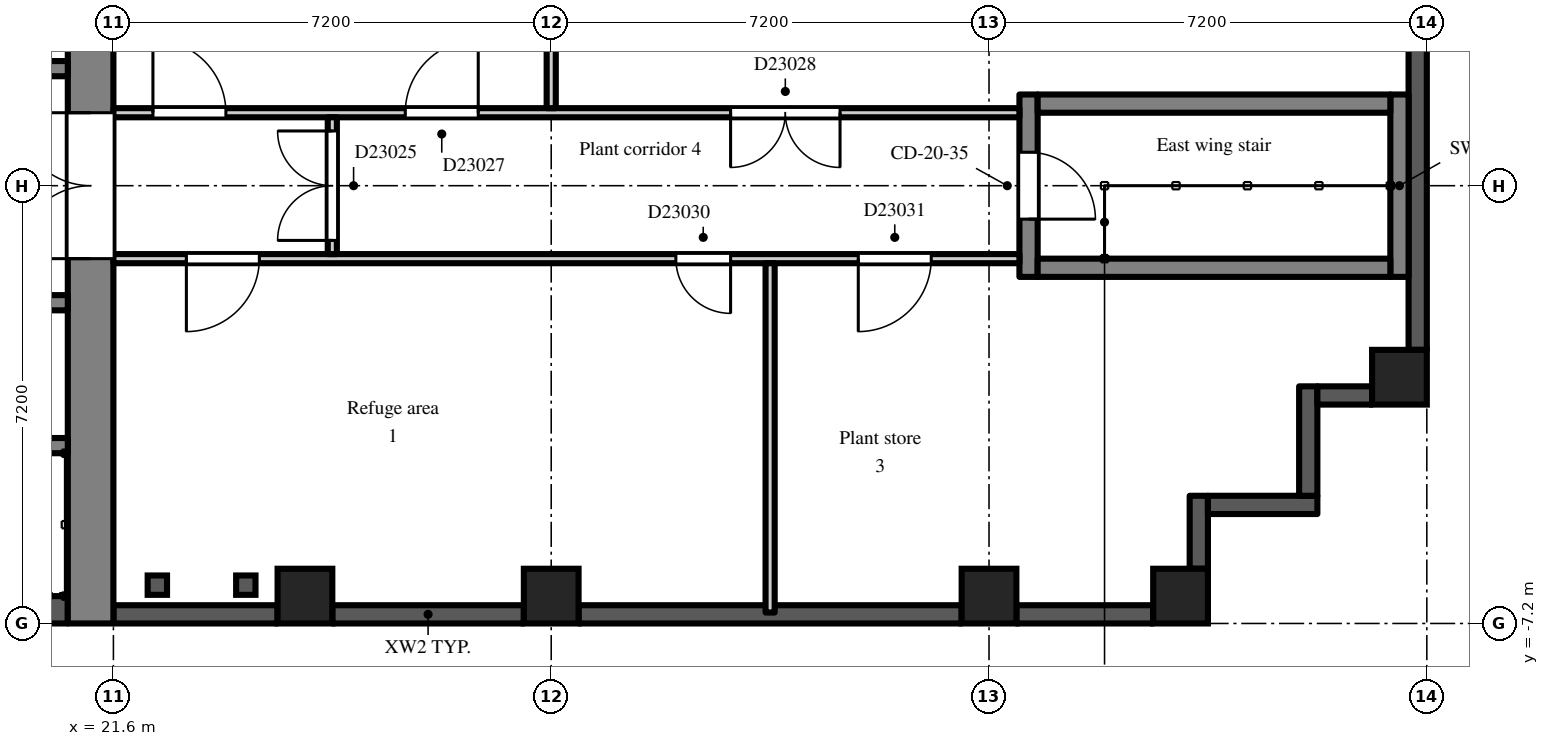
"""IFC4 building model, lengths in metres.
Left out: names, types, materials, properties, quantities, classifications, styles, units other than length and angle.
Written with IfcOpenShell. Run it as: python <this file> out.ifc"""

import sys

from ifc_helpers import new_model, si_unit, direction, frame, frame_2d, origin, origin_2d, place, context, subcontext, project, spatial, polyline, rectangle, outline, extrude, element, fill, save


model = new_model("IFC4")
c1 = context("Model", 3, precision=1e-05, world=origin(), true_north=direction((0.0, 1.0)))
c2 = subcontext(c1, "Body", "Model", "MODEL_VIEW")
j1 = project(units=[si_unit("LENGTHUNIT", "METRE"), si_unit("PLANEANGLEUNIT", "RADIAN")], contexts=[c1])
p1 = place(None, origin())
s1 = spatial("IfcSite", under=j1, at=p1, CompositionType="ELEMENT")
p2 = place(p1, origin())
s2 = spatial("IfcBuilding", under=s1, at=p2, CompositionType="ELEMENT")
p3 = place(p2, frame((0.0, 0.0, 162.3)))
s3 = spatial("IfcBuildingStorey", under=s2, at=p3, CompositionType="ELEMENT", Elevation=162.3)
for number, where, z_axis, x_axis in (
    (1, (24.75, -6.75, 0.0), (0.0, 0.0, 1.0), (1.0, 0.0, 0.0)),
    (2, (28.8, -6.75, 0.0), (0.0, 0.0, 1.0), (1.0, 0.0, 0.0)),
    (3, (36.0, -6.75, 0.0), (0.0, 0.0, 1.0), (1.0, 0.0, 0.0)),
    (4, (39.15, -6.75, 0.0), (0.0, 0.0, 1.0), (1.0, 0.0, 0.0)),
    (5, (42.75, -3.15, 0.0), (0.0, 0.0, 1.0), (1.0, 0.0, 0.0)),
):
    element("IfcColumn", number, at=place(p3, frame(where, z_axis=z_axis, x_axis=x_axis)), inside=s3, PredefinedType="COLUMN", context=c2, shape_type="SweptSolid", body=[
        extrude(rectangle(XDim=0.9, YDim=0.9, at=origin_2d()), origin(), (0.0, 0.0, 1.0), 4.2),
    ])
p4 = place(p3, frame((21.6, -7.05, 0.0), z_axis=(0.0, 0.0, 1.0), x_axis=(1.0, 0.0, 0.0)))
e6 = element("IfcWall", 6, at=p4, inside=s3, PredefinedType="SOLIDWALL", context=c2, shape_type="SweptSolid", body=[
    extrude(rectangle(XDim=2.7, YDim=0.3, at=frame_2d((1.35, 0.0))), origin(), (0.0, 0.0, 1.0), 3.4),
])
p5 = place(p3, frame((25.2, -7.05, 0.0), z_axis=(0.0, 0.0, 1.0), x_axis=(1.0, 0.0, 0.0)))
e7 = element("IfcWall", 7, at=p5, inside=s3, PredefinedType="SOLIDWALL", context=c2, shape_type="SweptSolid", body=[
    extrude(rectangle(XDim=3.15, YDim=0.3, at=frame_2d((1.575, 0.0))), origin(), (0.0, 0.0, 1.0), 3.8),
])
p6 = place(p3, frame((29.25, -7.05, 0.0), z_axis=(0.0, 0.0, 1.0), x_axis=(1.0, 0.0, 0.0)))
e8 = element("IfcWall", 8, at=p6, inside=s3, PredefinedType="SOLIDWALL", context=c2, shape_type="SweptSolid", body=[
    extrude(outline(polyline([(0.0, 0.0), (6.3, 0.0), (6.3, 3.8), (1.952, 3.8), (1.95, 3.4), (1.15, 3.4), (1.148, 3.8), (0.0, 3.8), (0.0, 0.0)])), frame((0.0, 0.15, 0.0), z_axis=(0.0, -1.0, 0.0), x_axis=(1.0, 0.0, 0.0)), (0.0, 0.0, 1.0), 0.3),
])
p7 = place(p3, frame((36.45, -7.05, 0.0), z_axis=(0.0, 0.0, 1.0), x_axis=(1.0, 0.0, 0.0)))
e9 = element("IfcWall", 9, at=p7, inside=s3, PredefinedType="SOLIDWALL", context=c2, shape_type="SweptSolid", body=[
    extrude(rectangle(XDim=2.25, YDim=0.3, at=frame_2d((1.125, 0.0))), origin(), (0.0, 0.0, 1.0), 3.8),
])
p8 = place(p3, frame((39.45, -6.3, 0.0), z_axis=(0.0, 0.0, 1.0), x_axis=(0.0, 1.0, 0.0)))
e10 = element("IfcWall", 10, at=p8, inside=s3, PredefinedType="SOLIDWALL", context=c2, shape_type="SweptSolid", body=[
    extrude(rectangle(XDim=1.2, YDim=0.3, at=frame_2d((0.6, 0.0))), origin(), (0.0, 0.0, 1.0), 3.8),
])
p9 = place(p3, frame((39.6, -5.25, 0.0), z_axis=(0.0, 0.0, 1.0), x_axis=(1.0, 0.0, 0.0)))
e11 = element("IfcWall", 11, at=p9, inside=s3, PredefinedType="SOLIDWALL", context=c2, shape_type="SweptSolid", body=[
    extrude(rectangle(XDim=1.8, YDim=0.3, at=frame_2d((0.9, 0.0))), origin(), (0.0, 0.0, 1.0), 3.8),
])
p10 = place(p3, frame((41.25, -5.1, 0.0), z_axis=(0.0, 0.0, 1.0), x_axis=(0.0, 1.0, 0.0)))
e12 = element("IfcWall", 12, at=p10, inside=s3, PredefinedType="SOLIDWALL", context=c2, shape_type="SweptSolid", body=[
    extrude(rectangle(XDim=1.8, YDim=0.3, at=frame_2d((0.9, 0.0))), origin(), (0.0, 0.0, 1.0), 3.8),
])
p11 = place(p3, frame((41.4, -3.45, 0.0), z_axis=(0.0, 0.0, 1.0), x_axis=(1.0, 0.0, 0.0)))
e13 = element("IfcWall", 13, at=p11, inside=s3, PredefinedType="SOLIDWALL", context=c2, shape_type="SweptSolid", body=[
    extrude(rectangle(XDim=0.9, YDim=0.3, at=frame_2d((0.45, 0.0))), origin(), (0.0, 0.0, 1.0), 3.8),
])
p12 = place(p3, frame((43.05, -2.7, 0.0), z_axis=(0.0, 0.0, 1.0), x_axis=(0.0, 1.0, 0.0)))
e14 = element("IfcWall", 14, at=p12, inside=s3, PredefinedType="SOLIDWALL", context=c2, shape_type="SweptSolid", body=[
    extrude(rectangle(XDim=5.4, YDim=0.3, at=frame_2d((2.7, 0.0))), origin(), (0.0, 0.0, 1.0), 3.8),
])
p13 = place(p3, frame((21.225, -7.2, 0.0), z_axis=(0.0, 0.0, 1.0), x_axis=(0.0, 1.0, 0.0)))
e15 = element("IfcWall", 15, at=p13, inside=s3, PredefinedType="SHEAR", context=c2, shape_type="SweptSolid", body=[
    extrude(rectangle(XDim=14.4, YDim=0.75, at=frame_2d((7.2, 0.0))), origin(), (0.0, 0.0, 1.0), 3.8),
])
p14 = place(p13, frame((6.0, 0.0, 0.0)))
e16 = element("IfcOpeningElement", 16, at=p14, cuts=e15, PredefinedType="OPENING", context=c2, shape_type="SweptSolid", body=[
    extrude(rectangle(XDim=2.4, YDim=2.2, at=frame_2d((1.2, 1.1))), frame((0.0, 0.385, 0.0), z_axis=(0.0, -1.0, 0.0), x_axis=(1.0, 0.0, 0.0)), (0.0, 0.0, 1.0), 0.77),
])
p15 = place(p3, frame((7.9, 1.925, 0.0), z_axis=(0.0, 0.0, 1.0), x_axis=(1.0, 0.0, 0.0)))
e17 = element("IfcWall", 17, at=p15, inside=s3, PredefinedType="SHEAR", context=c2, shape_type="SweptSolid", body=[
    extrude(rectangle(XDim=12.95, YDim=0.25, at=frame_2d((6.475, 0.0))), origin(), (0.0, 0.0, 1.0), 3.8),
])
p16 = place(p15, frame((4.825, 0.0, 0.0)))
e18 = element("IfcOpeningElement", 18, at=p16, cuts=e17, PredefinedType="OPENING", context=c2, shape_type="SweptSolid", body=[
    extrude(rectangle(XDim=1.1, YDim=2.1, at=frame_2d((0.55, 1.05))), frame((0.0, 0.135, 0.0), z_axis=(0.0, -1.0, 0.0), x_axis=(1.0, 0.0, 0.0)), (0.0, 0.0, 1.0), 0.27),
])
p17 = place(p15, frame((7.025, 0.0, 0.0)))
e19 = element("IfcOpeningElement", 19, at=p17, cuts=e17, PredefinedType="OPENING", context=c2, shape_type="SweptSolid", body=[
    extrude(rectangle(XDim=1.1, YDim=2.1, at=frame_2d((0.55, 1.05))), frame((0.0, 0.135, 0.0), z_axis=(0.0, -1.0, 0.0), x_axis=(1.0, 0.0, 0.0)), (0.0, 0.0, 1.0), 0.27),
])
p18 = place(p15, frame((9.225, 0.0, 0.0)))
e20 = element("IfcOpeningElement", 20, at=p18, cuts=e17, PredefinedType="OPENING", context=c2, shape_type="SweptSolid", body=[
    extrude(rectangle(XDim=1.1, YDim=2.1, at=frame_2d((0.55, 1.05))), frame((0.0, 0.135, 0.0), z_axis=(0.0, -1.0, 0.0), x_axis=(1.0, 0.0, 0.0)), (0.0, 0.0, 1.0), 0.27),
])
p19 = place(p15, frame((0.525, 0.0, 0.0)))
e21 = element("IfcOpeningElement", 21, at=p19, cuts=e17, PredefinedType="OPENING", context=c2, shape_type="SweptSolid", body=[
    extrude(rectangle(XDim=0.9, YDim=2.1, at=frame_2d((0.45, 1.05))), frame((0.0, 0.135, 0.0), z_axis=(0.0, -1.0, 0.0), x_axis=(1.0, 0.0, 0.0)), (0.0, 0.0, 1.0), 0.27),
])
p20 = place(p15, frame((2.625, 0.0, 0.0)))
e22 = element("IfcOpeningElement", 22, at=p20, cuts=e17, PredefinedType="OPENING", context=c2, shape_type="SweptSolid", body=[
    extrude(rectangle(XDim=1.1, YDim=2.1, at=frame_2d((0.55, 1.05))), frame((0.0, 0.135, 0.0), z_axis=(0.0, -1.0, 0.0), x_axis=(1.0, 0.0, 0.0)), (0.0, 0.0, 1.0), 0.27),
])
p21 = place(p15, frame((11.525, 0.0, 0.0)))
e23 = element("IfcOpeningElement", 23, at=p21, cuts=e17, PredefinedType="OPENING", context=c2, shape_type="SweptSolid", body=[
    extrude(rectangle(XDim=0.9, YDim=2.1, at=frame_2d((0.45, 1.05))), frame((0.0, 0.135, 0.0), z_axis=(0.0, -1.0, 0.0), x_axis=(1.0, 0.0, 0.0)), (0.0, 0.0, 1.0), 0.27),
])
p22 = place(p3, frame((7.9, -6.975, 0.0), z_axis=(0.0, 0.0, 1.0), x_axis=(1.0, 0.0, 0.0)))
e24 = element("IfcWall", 24, at=p22, inside=s3, PredefinedType="SHEAR", context=c2, shape_type="SweptSolid", body=[
    extrude(rectangle(XDim=12.95, YDim=0.45, at=frame_2d((6.475, 0.0))), origin(), (0.0, 0.0, 1.0), 3.8),
])
p23 = place(p3, frame((7.9, -1.925, 0.0), z_axis=(0.0, 0.0, 1.0), x_axis=(1.0, 0.0, 0.0)))
e25 = element("IfcWall", 25, at=p23, inside=s3, PredefinedType="SHEAR", context=c2, shape_type="SweptSolid", body=[
    extrude(rectangle(XDim=12.95, YDim=0.25, at=frame_2d((6.475, 0.0))), origin(), (0.0, 0.0, 1.0), 3.8),
])
p24 = place(p23, frame((0.525, 0.0, 0.0)))
e26 = element("IfcOpeningElement", 26, at=p24, cuts=e25, PredefinedType="OPENING", context=c2, shape_type="SweptSolid", body=[
    extrude(rectangle(XDim=0.9, YDim=2.1, at=frame_2d((0.45, 1.05))), frame((0.0, 0.135, 0.0), z_axis=(0.0, -1.0, 0.0), x_axis=(1.0, 0.0, 0.0)), (0.0, 0.0, 1.0), 0.27),
])
p25 = place(p23, frame((2.625, 0.0, 0.0)))
e27 = element("IfcOpeningElement", 27, at=p25, cuts=e25, PredefinedType="OPENING", context=c2, shape_type="SweptSolid", body=[
    extrude(rectangle(XDim=1.1, YDim=2.1, at=frame_2d((0.55, 1.05))), frame((0.0, 0.135, 0.0), z_axis=(0.0, -1.0, 0.0), x_axis=(1.0, 0.0, 0.0)), (0.0, 0.0, 1.0), 0.27),
])
p26 = place(p23, frame((4.925, 0.0, 0.0)))
e28 = element("IfcOpeningElement", 28, at=p26, cuts=e25, PredefinedType="OPENING", context=c2, shape_type="SweptSolid", body=[
    extrude(rectangle(XDim=0.9, YDim=2.1, at=frame_2d((0.45, 1.05))), frame((0.0, 0.135, 0.0), z_axis=(0.0, -1.0, 0.0), x_axis=(1.0, 0.0, 0.0)), (0.0, 0.0, 1.0), 0.27),
])
p27 = place(p23, frame((8.225, 0.0, 0.0)))
e29 = element("IfcOpeningElement", 29, at=p27, cuts=e25, PredefinedType="OPENING", context=c2, shape_type="SweptSolid", body=[
    extrude(rectangle(XDim=0.9, YDim=2.1, at=frame_2d((0.45, 1.05))), frame((0.0, 0.135, 0.0), z_axis=(0.0, -1.0, 0.0), x_axis=(1.0, 0.0, 0.0)), (0.0, 0.0, 1.0), 0.27),
])
p28 = place(p23, frame((11.525, 0.0, 0.0)))
e30 = element("IfcOpeningElement", 30, at=p28, cuts=e25, PredefinedType="OPENING", context=c2, shape_type="SweptSolid", body=[
    extrude(rectangle(XDim=0.9, YDim=2.1, at=frame_2d((0.45, 1.05))), frame((0.0, 0.135, 0.0), z_axis=(0.0, -1.0, 0.0), x_axis=(1.0, 0.0, 0.0)), (0.0, 0.0, 1.0), 0.27),
])
p29 = place(p3, frame((12.3, -4.275, 0.0), z_axis=(0.0, 0.0, 1.0), x_axis=(1.0, 0.0, 0.0)))
e31 = element("IfcWall", 31, at=p29, inside=s3, PredefinedType="SHEAR", context=c2, shape_type="SweptSolid", body=[
    extrude(rectangle(XDim=8.55, YDim=0.25, at=frame_2d((4.275, 0.0))), origin(), (0.0, 0.0, 1.0), 3.8),
])
p30 = place(p3, frame((36.65, -1.5, 0.0), z_axis=(0.0, 0.0, 1.0), x_axis=(0.0, 1.0, 0.0)))
e32 = element("IfcWall", 32, at=p30, inside=s3, PredefinedType="SHEAR", context=c2, shape_type="SweptSolid", body=[
    extrude(rectangle(XDim=3.0, YDim=0.3, at=frame_2d((1.5, 0.0))), origin(), (0.0, 0.0, 1.0), 3.8),
])
p31 = place(p30, frame((0.95, 0.0, 0.0)))
e33 = element("IfcOpeningElement", 33, at=p31, cuts=e32, PredefinedType="OPENING", context=c2, shape_type="SweptSolid", body=[
    extrude(rectangle(XDim=1.1, YDim=2.1, at=frame_2d((0.55, 1.05))), frame((0.0, 0.16, 0.0), z_axis=(0.0, -1.0, 0.0), x_axis=(1.0, 0.0, 0.0)), (0.0, 0.0, 1.0), 0.32),
])
p32 = place(p3, frame((42.75, -1.5, 0.0), z_axis=(0.0, 0.0, 1.0), x_axis=(0.0, 1.0, 0.0)))
e34 = element("IfcWall", 34, at=p32, inside=s3, PredefinedType="SHEAR", context=c2, shape_type="SweptSolid", body=[
    extrude(rectangle(XDim=3.0, YDim=0.3, at=frame_2d((1.5, 0.0))), origin(), (0.0, 0.0, 1.0), 3.8),
])
for number, where, z_axis, x_axis in (
    (35, (36.8, -1.35, 0.0), (0.0, 0.0, 1.0), (1.0, 0.0, 0.0)),
    (36, (36.8, 1.35, 0.0), (0.0, 0.0, 1.0), (1.0, 0.0, 0.0)),
):
    element("IfcWall", number, at=place(p3, frame(where, z_axis=z_axis, x_axis=x_axis)), inside=s3, PredefinedType="SHEAR", context=c2, shape_type="SweptSolid", body=[
        extrude(rectangle(XDim=5.8, YDim=0.3, at=frame_2d((2.9, 0.0))), origin(), (0.0, 0.0, 1.0), 3.8),
    ])
p33 = place(p3, frame((21.6, -1.2, 0.0), z_axis=(0.0, 0.0, 1.0), x_axis=(1.0, 0.0, 0.0)))
e37 = element("IfcWall", 37, at=p33, inside=s3, PredefinedType="PARTITIONING", context=c2, shape_type="SweptSolid", body=[
    extrude(outline(polyline([(0.0, 0.0), (14.9, 0.0), (14.9, 3.8), (9.602, 3.8), (9.6, 3.4), (8.8, 3.4), (8.798, 3.8), (0.0, 3.8), (0.0, 0.0)])), frame((0.0, 0.075, 0.0), z_axis=(0.0, -1.0, 0.0), x_axis=(1.0, 0.0, 0.0)), (0.0, 0.0, 1.0), 0.15),
])
p34 = place(p33, frame((1.2, 0.0, 0.0)))
e38 = element("IfcOpeningElement", 38, at=p34, cuts=e37, PredefinedType="OPENING", context=c2, shape_type="SweptSolid", body=[
    extrude(rectangle(XDim=1.2, YDim=2.1, at=frame_2d((0.6, 1.05))), frame((0.0, 0.085, 0.0), z_axis=(0.0, -1.0, 0.0), x_axis=(1.0, 0.0, 0.0)), (0.0, 0.0, 1.0), 0.17),
])
p35 = place(p33, frame((9.25, 0.0, 0.0)))
e39 = element("IfcOpeningElement", 39, at=p35, cuts=e37, PredefinedType="OPENING", context=c2, shape_type="SweptSolid", body=[
    extrude(rectangle(XDim=0.9, YDim=2.1, at=frame_2d((0.45, 1.05))), frame((0.0, 0.085, 0.0), z_axis=(0.0, -1.0, 0.0), x_axis=(1.0, 0.0, 0.0)), (0.0, 0.0, 1.0), 0.17),
])
p36 = place(p33, frame((12.25, 0.0, 0.0)))
e40 = element("IfcOpeningElement", 40, at=p36, cuts=e37, PredefinedType="OPENING", context=c2, shape_type="SweptSolid", body=[
    extrude(rectangle(XDim=1.2, YDim=2.1, at=frame_2d((0.6, 1.05))), frame((0.0, 0.085, 0.0), z_axis=(0.0, -1.0, 0.0), x_axis=(1.0, 0.0, 0.0)), (0.0, 0.0, 1.0), 0.17),
])
p37 = place(p3, frame((21.6, 1.2, 0.0), z_axis=(0.0, 0.0, 1.0), x_axis=(1.0, 0.0, 0.0)))
e41 = element("IfcWall", 41, at=p37, inside=s3, PredefinedType="PARTITIONING", context=c2, shape_type="SweptSolid", body=[
    extrude(outline(polyline([(0.0, 0.0), (14.9, 0.0), (14.9, 3.8), (9.602, 3.8), (9.6, 3.4), (8.8, 3.4), (8.798, 3.8), (0.0, 3.8), (0.0, 0.0)])), frame((0.0, 0.075, 0.0), z_axis=(0.0, -1.0, 0.0), x_axis=(1.0, 0.0, 0.0)), (0.0, 0.0, 1.0), 0.15),
])
p38 = place(p37, frame((0.65, 0.0, 0.0)))
e42 = element("IfcOpeningElement", 42, at=p38, cuts=e41, PredefinedType="OPENING", context=c2, shape_type="SweptSolid", body=[
    extrude(rectangle(XDim=1.2, YDim=2.1, at=frame_2d((0.6, 1.05))), frame((0.0, 0.085, 0.0), z_axis=(0.0, -1.0, 0.0), x_axis=(1.0, 0.0, 0.0)), (0.0, 0.0, 1.0), 0.17),
])
p39 = place(p37, frame((4.8, 0.0, 0.0)))
e43 = element("IfcOpeningElement", 43, at=p39, cuts=e41, PredefinedType="OPENING", context=c2, shape_type="SweptSolid", body=[
    extrude(rectangle(XDim=1.2, YDim=2.1, at=frame_2d((0.6, 1.05))), frame((0.0, 0.085, 0.0), z_axis=(0.0, -1.0, 0.0), x_axis=(1.0, 0.0, 0.0)), (0.0, 0.0, 1.0), 0.17),
])
p40 = place(p37, frame((10.15, 0.0, 0.0)))
e44 = element("IfcOpeningElement", 44, at=p40, cuts=e41, PredefinedType="OPENING", context=c2, shape_type="SweptSolid", body=[
    extrude(rectangle(XDim=1.8, YDim=2.1, at=frame_2d((0.9, 1.05))), frame((0.0, 0.085, 0.0), z_axis=(0.0, -1.0, 0.0), x_axis=(1.0, 0.0, 0.0)), (0.0, 0.0, 1.0), 0.17),
])
p41 = place(p3, frame((25.2, -1.125, 0.0), z_axis=(0.0, 0.0, 1.0), x_axis=(0.0, 1.0, 0.0)))
e45 = element("IfcWall", 45, at=p41, inside=s3, PredefinedType="PARTITIONING", context=c2, shape_type="SweptSolid", body=[
    extrude(rectangle(XDim=2.25, YDim=0.15, at=frame_2d((1.125, 0.0))), origin(), (0.0, 0.0, 1.0), 3.8),
])
p42 = place(p41, frame((0.225, 0.0, 0.0)))
e46 = element("IfcOpeningElement", 46, at=p42, cuts=e45, PredefinedType="OPENING", context=c2, shape_type="SweptSolid", body=[
    extrude(rectangle(XDim=1.8, YDim=2.1, at=frame_2d((0.9, 1.05))), frame((0.0, 0.085, 0.0), z_axis=(0.0, -1.0, 0.0), x_axis=(1.0, 0.0, 0.0)), (0.0, 0.0, 1.0), 0.17),
])
p43 = place(p3, frame((28.8, 1.275, 0.0), z_axis=(0.0, 0.0, 1.0), x_axis=(0.0, 1.0, 0.0)))
e47 = element("IfcWall", 47, at=p43, inside=s3, PredefinedType="PARTITIONING", context=c2, shape_type="SweptSolid", body=[
    extrude(rectangle(XDim=5.625, YDim=0.15, at=frame_2d((2.812, 0.0))), origin(), (0.0, 0.0, 1.0), 2.3),
])
p44 = place(p3, frame((32.4, -7.02, 0.0), z_axis=(0.0, 0.0, 1.0), x_axis=(0.0, 1.0, 0.0)))
e48 = element("IfcWall", 48, at=p44, inside=s3, PredefinedType="PARTITIONING", context=c2, shape_type="SweptSolid", body=[
    extrude(rectangle(XDim=5.745, YDim=0.15, at=frame_2d((2.873, 0.0))), origin(), (0.0, 0.0, 1.0), 3.8),
])
p45 = place(p14, origin())
e49 = element("IfcDoor", 49, at=p45, inside=s3, OperationType="DOUBLE_DOOR_DOUBLE_SWING", PredefinedType="DOOR", context=c2, shape_type="SweptSolid", body=[
    extrude(rectangle(XDim=2.4, YDim=2.2, at=frame_2d((1.2, 1.1))), frame((0.0, 0.025, 0.0), z_axis=(0.0, -1.0, 0.0), x_axis=(1.0, 0.0, 0.0)), (0.0, 0.0, 1.0), 0.05),
])
fill(e16, e49)
p46 = place(p31, frame((1.1, 0.0, 0.0), z_axis=(0.0, 0.0, 1.0), x_axis=(-1.0, 0.0, 0.0)))
e50 = element("IfcDoor", 50, at=p46, inside=s3, OperationType="SINGLE_SWING_RIGHT", PredefinedType="DOOR", context=c2, shape_type="SweptSolid", body=[
    extrude(rectangle(XDim=1.1, YDim=2.1, at=frame_2d((0.55, 1.05))), frame((0.0, 0.025, 0.0), z_axis=(0.0, -1.0, 0.0), x_axis=(1.0, 0.0, 0.0)), (0.0, 0.0, 1.0), 0.05),
])
fill(e33, e50)
p47 = place(p42, origin())
e51 = element("IfcDoor", 51, at=p47, inside=s3, OperationType="DOUBLE_DOOR_DOUBLE_SWING", PredefinedType="DOOR", context=c2, shape_type="SweptSolid", body=[
    extrude(rectangle(XDim=1.8, YDim=2.1, at=frame_2d((0.9, 1.05))), frame((0.0, 0.025, 0.0), z_axis=(0.0, -1.0, 0.0), x_axis=(1.0, 0.0, 0.0)), (0.0, 0.0, 1.0), 0.05),
])
fill(e46, e51)
p48 = place(p38, origin())
e52 = element("IfcDoor", 52, at=p48, inside=s3, OperationType="SINGLE_SWING_LEFT", PredefinedType="DOOR", context=c2, shape_type="SweptSolid", body=[
    extrude(rectangle(XDim=1.2, YDim=2.1, at=frame_2d((0.6, 1.05))), frame((0.0, 0.025, 0.0), z_axis=(0.0, -1.0, 0.0), x_axis=(1.0, 0.0, 0.0)), (0.0, 0.0, 1.0), 0.05),
])
fill(e42, e52)
p49 = place(p39, origin())
e53 = element("IfcDoor", 53, at=p49, inside=s3, OperationType="SINGLE_SWING_RIGHT", PredefinedType="DOOR", context=c2, shape_type="SweptSolid", body=[
    extrude(rectangle(XDim=1.2, YDim=2.1, at=frame_2d((0.6, 1.05))), frame((0.0, 0.025, 0.0), z_axis=(0.0, -1.0, 0.0), x_axis=(1.0, 0.0, 0.0)), (0.0, 0.0, 1.0), 0.05),
])
fill(e43, e53)
p50 = place(p40, frame((1.8, 0.0, 0.0), z_axis=(0.0, 0.0, 1.0), x_axis=(-1.0, 0.0, 0.0)))
e54 = element("IfcDoor", 54, at=p50, inside=s3, OperationType="DOUBLE_DOOR_DOUBLE_SWING", PredefinedType="DOOR", context=c2, shape_type="SweptSolid", body=[
    extrude(rectangle(XDim=1.8, YDim=2.1, at=frame_2d((0.9, 1.05))), frame((0.0, 0.025, 0.0), z_axis=(0.0, -1.0, 0.0), x_axis=(1.0, 0.0, 0.0)), (0.0, 0.0, 1.0), 0.05),
])
fill(e44, e54)
p51 = place(p34, frame((1.2, 0.0, 0.0), z_axis=(0.0, 0.0, 1.0), x_axis=(-1.0, 0.0, 0.0)))
e55 = element("IfcDoor", 55, at=p51, inside=s3, OperationType="SINGLE_SWING_RIGHT", PredefinedType="DOOR", context=c2, shape_type="SweptSolid", body=[
    extrude(rectangle(XDim=1.2, YDim=2.1, at=frame_2d((0.6, 1.05))), frame((0.0, 0.025, 0.0), z_axis=(0.0, -1.0, 0.0), x_axis=(1.0, 0.0, 0.0)), (0.0, 0.0, 1.0), 0.05),
])
fill(e38, e55)
p52 = place(p35, frame((0.9, 0.0, 0.0), z_axis=(0.0, 0.0, 1.0), x_axis=(-1.0, 0.0, 0.0)))
e56 = element("IfcDoor", 56, at=p52, inside=s3, OperationType="SINGLE_SWING_LEFT", PredefinedType="DOOR", context=c2, shape_type="SweptSolid", body=[
    extrude(rectangle(XDim=0.9, YDim=2.1, at=frame_2d((0.45, 1.05))), frame((0.0, 0.025, 0.0), z_axis=(0.0, -1.0, 0.0), x_axis=(1.0, 0.0, 0.0)), (0.0, 0.0, 1.0), 0.05),
])
fill(e39, e56)
p53 = place(p36, frame((1.2, 0.0, 0.0), z_axis=(0.0, 0.0, 1.0), x_axis=(-1.0, 0.0, 0.0)))
e57 = element("IfcDoor", 57, at=p53, inside=s3, OperationType="SINGLE_SWING_RIGHT", PredefinedType="DOOR", context=c2, shape_type="SweptSolid", body=[
    extrude(rectangle(XDim=1.2, YDim=2.1, at=frame_2d((0.6, 1.05))), frame((0.0, 0.025, 0.0), z_axis=(0.0, -1.0, 0.0), x_axis=(1.0, 0.0, 0.0)), (0.0, 0.0, 1.0), 0.05),
])
fill(e40, e57)
save(model, sys.argv[1])
